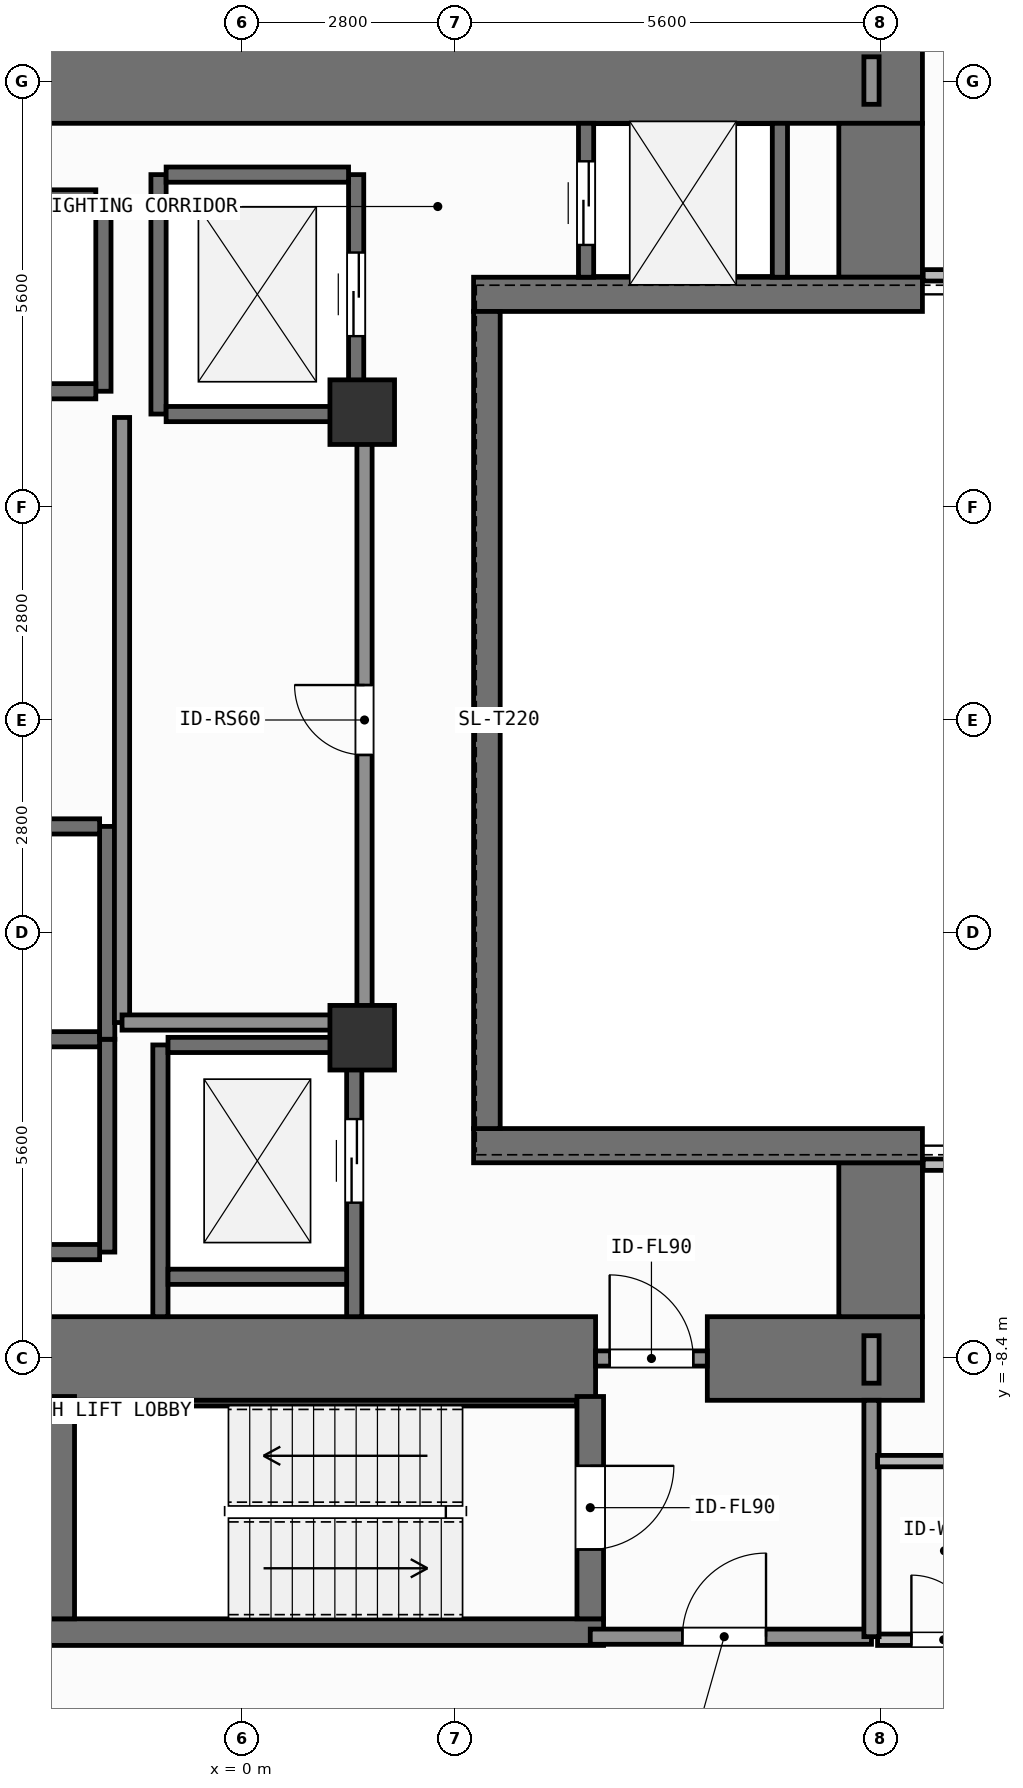
"""IFC4 building model, lengths in metres.
Left out: names, types, materials, properties, quantities, classifications, styles, units other than length and angle.
Written with IfcOpenShell. Run it as: python <this file> out.ifc"""

import sys

from ifc_helpers import new_model, si_unit, direction, frame, frame_2d, origin, origin_2d, place, context, subcontext, project, spatial, rectangle, extrude, element, fill, save


model = new_model("IFC4")
c1 = context("Model", 3, precision=1e-05, world=origin(), true_north=direction((0.0, 1.0)))
c2 = subcontext(c1, "Body", "Model", "MODEL_VIEW")
j1 = project(units=[si_unit("LENGTHUNIT", "METRE"), si_unit("PLANEANGLEUNIT", "RADIAN")], contexts=[c1])
p1 = place(None, origin())
s1 = spatial("IfcSite", under=j1, at=p1, CompositionType="ELEMENT")
p2 = place(p1, origin())
s2 = spatial("IfcBuilding", under=s1, at=p2, CompositionType="ELEMENT")
p3 = place(p2, frame((0.0, 0.0, 50.1)))
s3 = spatial("IfcBuildingStorey", under=s2, at=p3, CompositionType="ELEMENT", Elevation=50.1)
p4 = place(p3, frame((-2.62, -8.4, 0.0), z_axis=(0.0, 0.0, 1.0), x_axis=(1.0, 0.0, 0.0)))
e1 = element("IfcWall", 1, at=p4, inside=s3, PredefinedType="SHEAR", context=c2, shape_type="SweptSolid", body=[
    extrude(rectangle(XDim=7.27, YDim=1.1, at=frame_2d((3.635, 0.0))), origin(), (0.0, 0.0, 1.0), 3.9),
])
p5 = place(p3, frame((6.12, -8.4, 0.0), z_axis=(0.0, 0.0, 1.0), x_axis=(1.0, 0.0, 0.0)))
e2 = element("IfcWall", 2, at=p5, inside=s3, PredefinedType="SHEAR", context=c2, shape_type="SweptSolid", body=[
    extrude(rectangle(XDim=2.83, YDim=1.1, at=frame_2d((1.415, 0.0))), origin(), (0.0, 0.0, 1.0), 3.9),
])
p6 = place(p3, frame((-7.55, 8.4, 0.0), z_axis=(0.0, 0.0, 1.0), x_axis=(1.0, 0.0, 0.0)))
e3 = element("IfcWall", 3, at=p6, inside=s3, PredefinedType="SHEAR", context=c2, shape_type="SweptSolid", body=[
    extrude(rectangle(XDim=16.5, YDim=1.1, at=frame_2d((8.25, 0.0))), origin(), (0.0, 0.0, 1.0), 3.9),
])
for number, where, z_axis, x_axis in (
    (4, (8.4, -7.85, 0.0), (0.0, 0.0, 1.0), (0.0, 1.0, 0.0)),
    (5, (8.4, 5.825, 0.0), (0.0, 0.0, 1.0), (0.0, 1.0, 0.0)),
):
    element("IfcWall", number, at=place(p3, frame(where, z_axis=z_axis, x_axis=x_axis)), inside=s3, PredefinedType="SHEAR", context=c2, shape_type="SweptSolid", body=[
        extrude(rectangle(XDim=2.025, YDim=1.1, at=frame_2d((1.013, 0.0))), origin(), (0.0, 0.0, 1.0), 3.9),
    ])
for number, where, z_axis, x_axis in (
    (6, (3.045, -5.6, 0.0), (0.0, 0.0, 1.0), (1.0, 0.0, 0.0)),
    (7, (3.045, 5.6, 0.0), (0.0, 0.0, 1.0), (1.0, 0.0, 0.0)),
):
    element("IfcWall", number, at=place(p3, frame(where, z_axis=z_axis, x_axis=x_axis)), inside=s3, PredefinedType="SHEAR", context=c2, shape_type="SweptSolid", body=[
        extrude(rectangle(XDim=5.905, YDim=0.45, at=frame_2d((2.953, 0.0))), origin(), (0.0, 0.0, 1.0), 3.9),
    ])
p7 = place(p3, frame((3.22, -5.375, 0.0), z_axis=(0.0, 0.0, 1.0), x_axis=(0.0, 1.0, 0.0)))
e8 = element("IfcWall", 8, at=p7, inside=s3, PredefinedType="SHEAR", context=c2, shape_type="SweptSolid", body=[
    extrude(rectangle(XDim=10.75, YDim=0.35, at=frame_2d((5.375, 0.0))), origin(), (0.0, 0.0, 1.0), 3.9),
])
p8 = place(p3, frame((-2.555, -12.0, 0.0), z_axis=(0.0, 0.0, 1.0), x_axis=(1.0, 0.0, 0.0)))
e9 = element("IfcWall", 9, at=p8, inside=s3, PredefinedType="SHEAR", context=c2, shape_type="SweptSolid", body=[
    extrude(rectangle(XDim=7.31, YDim=0.35, at=frame_2d((3.655, 0.0))), origin(), (0.0, 0.0, 1.0), 3.9),
])
p9 = place(p3, frame((-2.2, -8.988, 0.0), z_axis=(0.0, 0.0, 1.0), x_axis=(1.0, 0.0, 0.0)))
e10 = element("IfcWall", 10, at=p9, inside=s3, PredefinedType="SHEAR", context=c2, shape_type="SweptSolid", body=[
    extrude(rectangle(XDim=6.6, YDim=0.075, at=frame_2d((3.3, 0.0))), origin(), (0.0, 0.0, 1.0), 3.9),
])
p10 = place(p3, frame((-2.38, -11.825, 0.0), z_axis=(0.0, 0.0, 1.0), x_axis=(0.0, 1.0, 0.0)))
e11 = element("IfcWall", 11, at=p10, inside=s3, PredefinedType="SHEAR", context=c2, shape_type="SweptSolid", body=[
    extrude(rectangle(XDim=2.925, YDim=0.35, at=frame_2d((1.462, 0.0))), origin(), (0.0, 0.0, 1.0), 3.9),
])
p11 = place(p3, frame((4.58, -8.9, 0.0), z_axis=(0.0, 0.0, 1.0), x_axis=(0.0, -1.0, 0.0)))
e12 = element("IfcWall", 12, at=p11, inside=s3, PredefinedType="SHEAR", context=c2, shape_type="SweptSolid", body=[
    extrude(rectangle(XDim=2.925, YDim=0.35, at=frame_2d((1.462, 0.0))), origin(), (0.0, 0.0, 1.0), 3.9),
])
p12 = place(p11, frame((0.913, 0.0, 0.0)))
e13 = element("IfcOpeningElement", 13, at=p12, cuts=e12, PredefinedType="OPENING", context=c2, shape_type="SweptSolid", body=[
    extrude(rectangle(XDim=1.1, YDim=2.15, at=frame_2d((0.55, 1.075))), frame((0.0, 0.185, 0.0), z_axis=(0.0, -1.0, 0.0), x_axis=(1.0, 0.0, 0.0)), (0.0, 0.0, 1.0), 0.37),
])
for number, where, z_axis, x_axis in (
    (14, (1.58, -4.18, 0.0), (0.0, 0.0, 1.0), (1.0, 0.0, 0.0)),
    (15, (1.58, 4.05, 0.0), (0.0, 0.0, 1.0), (1.0, 0.0, 0.0)),
):
    element("IfcColumn", number, at=place(p3, frame(where, z_axis=z_axis, x_axis=x_axis)), inside=s3, PredefinedType="COLUMN", context=c2, shape_type="SweptSolid", body=[
        extrude(rectangle(XDim=0.85, YDim=0.85, at=origin_2d()), origin(), (0.0, 0.0, 1.0), 3.9),
    ])
p13 = place(p3, frame((-1.825, 4.325, 0.0), z_axis=(0.0, 0.0, 1.0), x_axis=(0.0, 1.0, 0.0)))
e16 = element("IfcWall", 16, at=p13, inside=s3, PredefinedType="SHEAR", context=c2, shape_type="SweptSolid", body=[
    extrude(rectangle(XDim=2.55, YDim=0.2, at=frame_2d((1.275, 0.0))), origin(), (0.0, 0.0, 1.0), 3.62),
])
for number, where, z_axis, x_axis in (
    (17, (-4.275, 4.325, 0.0), (0.0, 0.0, 1.0), (1.0, 0.0, 0.0)),
    (18, (-4.275, 6.875, 0.0), (0.0, 0.0, 1.0), (1.0, 0.0, 0.0)),
):
    element("IfcWall", number, at=place(p3, frame(where, z_axis=z_axis, x_axis=x_axis)), inside=s3, PredefinedType="SHEAR", context=c2, shape_type="SweptSolid", body=[
        extrude(rectangle(XDim=2.35, YDim=0.2, at=frame_2d((1.175, 0.0))), origin(), (0.0, 0.0, 1.0), 3.62),
    ])
p14 = place(p3, frame((-1.775, -7.0, 0.0), z_axis=(0.0, 0.0, 1.0), x_axis=(0.0, 1.0, 0.0)))
e19 = element("IfcWall", 19, at=p14, inside=s3, PredefinedType="SHEAR", context=c2, shape_type="SweptSolid", body=[
    extrude(rectangle(XDim=2.8, YDim=0.2, at=frame_2d((1.4, 0.0))), origin(), (0.0, 0.0, 1.0), 3.62),
])
for number, where, z_axis, x_axis in (
    (20, (-4.325, -7.0, 0.0), (0.0, 0.0, 1.0), (1.0, 0.0, 0.0)),
    (21, (-4.325, -4.2, 0.0), (0.0, 0.0, 1.0), (1.0, 0.0, 0.0)),
):
    element("IfcWall", number, at=place(p3, frame(where, z_axis=z_axis, x_axis=x_axis)), inside=s3, PredefinedType="SHEAR", context=c2, shape_type="SweptSolid", body=[
        extrude(rectangle(XDim=2.45, YDim=0.2, at=frame_2d((1.225, 0.0))), origin(), (0.0, 0.0, 1.0), 3.62),
    ])
p15 = place(p3, frame((-1.775, -4.2, 0.0), z_axis=(0.0, 0.0, 1.0), x_axis=(0.0, 1.0, 0.0)))
e22 = element("IfcWall", 22, at=p15, inside=s3, PredefinedType="SHEAR", context=c2, shape_type="SweptSolid", body=[
    extrude(rectangle(XDim=2.8, YDim=0.2, at=frame_2d((1.4, 0.0))), origin(), (0.0, 0.0, 1.0), 3.62),
])
p16 = place(p3, frame((-4.325, -1.4, 0.0), z_axis=(0.0, 0.0, 1.0), x_axis=(1.0, 0.0, 0.0)))
e23 = element("IfcWall", 23, at=p16, inside=s3, PredefinedType="SHEAR", context=c2, shape_type="SweptSolid", body=[
    extrude(rectangle(XDim=2.45, YDim=0.2, at=frame_2d((1.225, 0.0))), origin(), (0.0, 0.0, 1.0), 3.62),
])
p17 = place(p3, frame((-1.1, 4.025, 0.0), z_axis=(0.0, 0.0, 1.0), x_axis=(0.0, 1.0, 0.0)))
e24 = element("IfcWall", 24, at=p17, inside=s3, PredefinedType="SHEAR", context=c2, shape_type="SweptSolid", body=[
    extrude(rectangle(XDim=3.15, YDim=0.2, at=frame_2d((1.575, 0.0))), origin(), (0.0, 0.0, 1.0), 3.62),
])
p18 = place(p3, frame((1.5, 4.025, 0.0), z_axis=(0.0, 0.0, 1.0), x_axis=(0.0, 1.0, 0.0)))
e25 = element("IfcWall", 25, at=p18, inside=s3, PredefinedType="SHEAR", context=c2, shape_type="SweptSolid", body=[
    extrude(rectangle(XDim=3.15, YDim=0.2, at=frame_2d((1.575, 0.0))), origin(), (0.0, 0.0, 1.0), 3.62),
])
p19 = place(p18, frame((1.025, 0.0, 0.0)))
e26 = element("IfcOpeningElement", 26, at=p19, cuts=e25, PredefinedType="OPENING", context=c2, shape_type="SweptSolid", body=[
    extrude(rectangle(XDim=1.1, YDim=2.2, at=frame_2d((0.55, 1.1))), frame((0.0, 0.11, 0.0), z_axis=(0.0, -1.0, 0.0), x_axis=(1.0, 0.0, 0.0)), (0.0, 0.0, 1.0), 0.22),
])
for number, where, z_axis, x_axis in (
    (27, (-1.0, 4.025, 0.0), (0.0, 0.0, 1.0), (1.0, 0.0, 0.0)),
    (28, (-1.0, 7.175, 0.0), (0.0, 0.0, 1.0), (1.0, 0.0, 0.0)),
):
    element("IfcWall", number, at=place(p3, frame(where, z_axis=z_axis, x_axis=x_axis)), inside=s3, PredefinedType="SHEAR", context=c2, shape_type="SweptSolid", body=[
        extrude(rectangle(XDim=2.4, YDim=0.2, at=frame_2d((1.2, 0.0))), origin(), (0.0, 0.0, 1.0), 3.62),
    ])
p20 = place(p3, frame((-1.075, -7.85, 0.0), z_axis=(0.0, 0.0, 1.0), x_axis=(0.0, 1.0, 0.0)))
e29 = element("IfcWall", 29, at=p20, inside=s3, PredefinedType="SHEAR", context=c2, shape_type="SweptSolid", body=[
    extrude(rectangle(XDim=3.575, YDim=0.2, at=frame_2d((1.788, 0.0))), origin(), (0.0, 0.0, 1.0), 3.62),
])
p21 = place(p3, frame((1.475, -7.85, 0.0), z_axis=(0.0, 0.0, 1.0), x_axis=(0.0, 1.0, 0.0)))
e30 = element("IfcWall", 30, at=p21, inside=s3, PredefinedType="SHEAR", context=c2, shape_type="SweptSolid", body=[
    extrude(rectangle(XDim=3.575, YDim=0.2, at=frame_2d((1.788, 0.0))), origin(), (0.0, 0.0, 1.0), 3.62),
])
p22 = place(p21, frame((1.5, 0.0, 0.0)))
e31 = element("IfcOpeningElement", 31, at=p22, cuts=e30, PredefinedType="OPENING", context=c2, shape_type="SweptSolid", body=[
    extrude(rectangle(XDim=1.1, YDim=2.2, at=frame_2d((0.55, 1.1))), frame((0.0, 0.11, 0.0), z_axis=(0.0, -1.0, 0.0), x_axis=(1.0, 0.0, 0.0)), (0.0, 0.0, 1.0), 0.22),
])
for number, where, z_axis, x_axis in (
    (32, (-0.975, -7.325, 0.0), (0.0, 0.0, 1.0), (1.0, 0.0, 0.0)),
    (33, (-0.975, -4.275, 0.0), (0.0, 0.0, 1.0), (1.0, 0.0, 0.0)),
):
    element("IfcWall", number, at=place(p3, frame(where, z_axis=z_axis, x_axis=x_axis)), inside=s3, PredefinedType="SHEAR", context=c2, shape_type="SweptSolid", body=[
        extrude(rectangle(XDim=2.35, YDim=0.2, at=frame_2d((1.175, 0.0))), origin(), (0.0, 0.0, 1.0), 3.62),
    ])
p23 = place(p3, frame((4.525, 5.825, 0.0), z_axis=(0.0, 0.0, 1.0), x_axis=(0.0, 1.0, 0.0)))
e34 = element("IfcWall", 34, at=p23, inside=s3, PredefinedType="SHEAR", context=c2, shape_type="SweptSolid", body=[
    extrude(rectangle(XDim=2.025, YDim=0.2, at=frame_2d((1.013, 0.0))), origin(), (0.0, 0.0, 1.0), 3.62),
])
p24 = place(p23, frame((0.425, 0.0, 0.0)))
e35 = element("IfcOpeningElement", 35, at=p24, cuts=e34, PredefinedType="OPENING", context=c2, shape_type="SweptSolid", body=[
    extrude(rectangle(XDim=1.1, YDim=2.2, at=frame_2d((0.55, 1.1))), frame((0.0, 0.11, 0.0), z_axis=(0.0, -1.0, 0.0), x_axis=(1.0, 0.0, 0.0)), (0.0, 0.0, 1.0), 0.22),
])
p25 = place(p3, frame((7.075, 5.825, 0.0), z_axis=(0.0, 0.0, 1.0), x_axis=(0.0, 1.0, 0.0)))
e36 = element("IfcWall", 36, at=p25, inside=s3, PredefinedType="SHEAR", context=c2, shape_type="SweptSolid", body=[
    extrude(rectangle(XDim=2.025, YDim=0.2, at=frame_2d((1.013, 0.0))), origin(), (0.0, 0.0, 1.0), 3.62),
])
p26 = place(p3, frame((4.58, -12.06, 0.0), z_axis=(0.0, 0.0, 1.0), x_axis=(1.0, 0.0, 0.0)))
e37 = element("IfcWall", 37, at=p26, inside=s3, PredefinedType="SOLIDWALL", context=c2, shape_type="SweptSolid", body=[
    extrude(rectangle(XDim=3.7, YDim=0.2, at=frame_2d((1.85, 0.0))), origin(), (0.0, 0.0, 1.0), 3.62),
])
p27 = place(p26, frame((1.212, 0.0, 0.0)))
e38 = element("IfcOpeningElement", 38, at=p27, cuts=e37, PredefinedType="OPENING", context=c2, shape_type="SweptSolid", body=[
    extrude(rectangle(XDim=1.1, YDim=2.15, at=frame_2d((0.55, 1.075))), frame((0.0, 0.11, 0.0), z_axis=(0.0, -1.0, 0.0), x_axis=(1.0, 0.0, 0.0)), (0.0, 0.0, 1.0), 0.22),
])
p28 = place(p3, frame((4.65, -8.4, 0.0), z_axis=(0.0, 0.0, 1.0), x_axis=(1.0, 0.0, 0.0)))
e39 = element("IfcWall", 39, at=p28, inside=s3, PredefinedType="SOLIDWALL", context=c2, shape_type="SweptSolid", body=[
    extrude(rectangle(XDim=1.47, YDim=0.2, at=frame_2d((0.735, 0.0))), origin(), (0.0, 0.0, 1.0), 2.66),
])
p29 = place(p28, frame((0.185, 0.0, 0.0)))
e40 = element("IfcOpeningElement", 40, at=p29, cuts=e39, PredefinedType="OPENING", context=c2, shape_type="SweptSolid", body=[
    extrude(rectangle(XDim=1.1, YDim=2.15, at=frame_2d((0.55, 1.075))), frame((0.0, 0.11, 0.0), z_axis=(0.0, -1.0, 0.0), x_axis=(1.0, 0.0, 0.0)), (0.0, 0.0, 1.0), 0.22),
])
p30 = place(p3, frame((1.61, -3.98, 0.0), z_axis=(0.0, 0.0, 1.0), x_axis=(0.0, 1.0, 0.0)))
e41 = element("IfcWall", 41, at=p30, inside=s3, PredefinedType="SOLIDWALL", context=c2, shape_type="SweptSolid", body=[
    extrude(rectangle(XDim=7.96, YDim=0.2, at=frame_2d((3.98, 0.0))), origin(), (0.0, 0.0, 1.0), 3.62),
])
p31 = place(p30, frame((3.52, 0.0, 0.0)))
e42 = element("IfcOpeningElement", 42, at=p31, cuts=e41, PredefinedType="OPENING", context=c2, shape_type="SweptSolid", body=[
    extrude(rectangle(XDim=0.92, YDim=2.1, at=frame_2d((0.46, 1.05))), frame((0.0, 0.11, 0.0), z_axis=(0.0, -1.0, 0.0), x_axis=(1.0, 0.0, 0.0)), (0.0, 0.0, 1.0), 0.22),
])
p32 = place(p3, frame((8.36, -12.1, 0.0), z_axis=(0.0, 0.0, 1.0), x_axis=(1.0, 0.0, 0.0)))
e43 = element("IfcWall", 43, at=p32, inside=s3, PredefinedType="PARTITIONING", context=c2, shape_type="SweptSolid", body=[
    extrude(rectangle(XDim=1.74, YDim=0.15, at=frame_2d((0.87, 0.0))), origin(), (0.0, 0.0, 1.0), 3.62),
])
p33 = place(p32, frame((0.445, 0.0, 0.0)))
e44 = element("IfcOpeningElement", 44, at=p33, cuts=e43, PredefinedType="OPENING", context=c2, shape_type="SweptSolid", body=[
    extrude(rectangle(XDim=0.85, YDim=2.1, at=frame_2d((0.425, 1.05))), frame((0.0, 0.085, 0.0), z_axis=(0.0, -1.0, 0.0), x_axis=(1.0, 0.0, 0.0)), (0.0, 0.0, 1.0), 0.17),
])
p34 = place(p3, frame((8.28, -12.06, 0.0), z_axis=(0.0, 0.0, 1.0), x_axis=(0.0, 1.0, 0.0)))
e45 = element("IfcWall", 45, at=p34, inside=s3, PredefinedType="SOLIDWALL", context=c2, shape_type="SweptSolid", body=[
    extrude(rectangle(XDim=3.11, YDim=0.2, at=frame_2d((1.555, 0.0))), origin(), (0.0, 0.0, 1.0), 3.62),
])
p35 = place(p3, frame((-1.58, -3.98, 0.0), z_axis=(0.0, 0.0, 1.0), x_axis=(0.0, 1.0, 0.0)))
e46 = element("IfcWall", 46, at=p35, inside=s3, PredefinedType="SOLIDWALL", context=c2, shape_type="SweptSolid", body=[
    extrude(rectangle(XDim=7.96, YDim=0.2, at=frame_2d((3.98, 0.0))), origin(), (0.0, 0.0, 1.0), 3.62),
])
p36 = place(p3, frame((-1.58, -3.98, 0.0), z_axis=(0.0, 0.0, 1.0), x_axis=(1.0, 0.0, 0.0)))
e47 = element("IfcWall", 47, at=p36, inside=s3, PredefinedType="SOLIDWALL", context=c2, shape_type="SweptSolid", body=[
    extrude(rectangle(XDim=3.19, YDim=0.2, at=frame_2d((1.595, 0.0))), origin(), (0.0, 0.0, 1.0), 3.62),
])
p37 = place(p3, frame((8.28, -8.725, 0.0), z_axis=(0.0, 0.0, 1.0), x_axis=(0.0, 1.0, 0.0)))
e48 = element("IfcWall", 48, at=p37, inside=s3, PredefinedType="SOLIDWALL", context=c2, shape_type="SweptSolid", body=[
    extrude(rectangle(XDim=0.625, YDim=0.2, at=frame_2d((0.312, 0.0))), origin(), (0.0, 0.0, 1.0), 3.62),
])
p38 = place(p3, frame((8.36, -9.75, 0.0), z_axis=(0.0, 0.0, 1.0), x_axis=(1.0, 0.0, 0.0)))
e49 = element("IfcWall", 49, at=p38, inside=s3, PredefinedType="PARTITIONING", context=c2, shape_type="SweptSolid", body=[
    extrude(rectangle(XDim=1.74, YDim=0.15, at=frame_2d((0.87, 0.0))), origin(), (0.0, 0.0, 1.0), 3.62),
])
p39 = place(p3, frame((8.96, -5.85, 0.0), z_axis=(0.0, 0.0, 1.0), x_axis=(1.0, 0.0, 0.0)))
e50 = element("IfcWall", 50, at=p39, inside=s3, PredefinedType="PARTITIONING", context=c2, shape_type="SweptSolid", body=[
    extrude(rectangle(XDim=6.62, YDim=0.15, at=frame_2d((3.31, 0.0))), origin(), (0.0, 0.0, 1.0), 3.62),
])
p40 = place(p3, frame((8.28, 8.1, 0.0), z_axis=(0.0, 0.0, 1.0), x_axis=(0.0, 1.0, 0.0)))
e51 = element("IfcWall", 51, at=p40, inside=s3, PredefinedType="SOLIDWALL", context=c2, shape_type="SweptSolid", body=[
    extrude(rectangle(XDim=0.625, YDim=0.2, at=frame_2d((0.312, 0.0))), origin(), (0.0, 0.0, 1.0), 3.62),
])
p41 = place(p3, frame((8.96, 5.85, 0.0), z_axis=(0.0, 0.0, 1.0), x_axis=(1.0, 0.0, 0.0)))
e52 = element("IfcWall", 52, at=p41, inside=s3, PredefinedType="PARTITIONING", context=c2, shape_type="SweptSolid", body=[
    extrude(rectangle(XDim=6.62, YDim=0.15, at=frame_2d((3.31, 0.0))), origin(), (0.0, 0.0, 1.0), 3.62),
])
p42 = place(p19, origin())
e53 = element("IfcDoor", 53, at=p42, inside=s3, OperationType="SLIDING_TO_LEFT", PredefinedType="DOOR", context=c2, shape_type="SweptSolid", body=[
    extrude(rectangle(XDim=1.1, YDim=2.2, at=frame_2d((0.55, 1.1))), frame((0.0, 0.025, 0.0), z_axis=(0.0, -1.0, 0.0), x_axis=(1.0, 0.0, 0.0)), (0.0, 0.0, 1.0), 0.05),
])
fill(e26, e53)
p43 = place(p22, origin())
e54 = element("IfcDoor", 54, at=p43, inside=s3, OperationType="SLIDING_TO_LEFT", PredefinedType="DOOR", context=c2, shape_type="SweptSolid", body=[
    extrude(rectangle(XDim=1.1, YDim=2.2, at=frame_2d((0.55, 1.1))), frame((0.0, 0.025, 0.0), z_axis=(0.0, -1.0, 0.0), x_axis=(1.0, 0.0, 0.0)), (0.0, 0.0, 1.0), 0.05),
])
fill(e31, e54)
p44 = place(p24, origin())
e55 = element("IfcDoor", 55, at=p44, inside=s3, OperationType="SLIDING_TO_LEFT", PredefinedType="DOOR", context=c2, shape_type="SweptSolid", body=[
    extrude(rectangle(XDim=1.1, YDim=2.2, at=frame_2d((0.55, 1.1))), frame((0.0, 0.025, 0.0), z_axis=(0.0, -1.0, 0.0), x_axis=(1.0, 0.0, 0.0)), (0.0, 0.0, 1.0), 0.05),
])
fill(e35, e55)
p45 = place(p12, origin())
e56 = element("IfcDoor", 56, at=p45, inside=s3, OperationType="SINGLE_SWING_LEFT", PredefinedType="DOOR", context=c2, shape_type="SweptSolid", body=[
    extrude(rectangle(XDim=1.1, YDim=2.15, at=frame_2d((0.55, 1.075))), frame((0.0, 0.025, 0.0), z_axis=(0.0, -1.0, 0.0), x_axis=(1.0, 0.0, 0.0)), (0.0, 0.0, 1.0), 0.05),
])
fill(e13, e56)
p46 = place(p27, origin())
e57 = element("IfcDoor", 57, at=p46, inside=s3, OperationType="SINGLE_SWING_RIGHT", PredefinedType="DOOR", context=c2, shape_type="SweptSolid", body=[
    extrude(rectangle(XDim=1.1, YDim=2.15, at=frame_2d((0.55, 1.075))), frame((0.0, 0.025, 0.0), z_axis=(0.0, -1.0, 0.0), x_axis=(1.0, 0.0, 0.0)), (0.0, 0.0, 1.0), 0.05),
])
fill(e38, e57)
p47 = place(p29, origin())
e58 = element("IfcDoor", 58, at=p47, inside=s3, OperationType="SINGLE_SWING_LEFT", PredefinedType="DOOR", context=c2, shape_type="SweptSolid", body=[
    extrude(rectangle(XDim=1.1, YDim=2.15, at=frame_2d((0.55, 1.075))), frame((0.0, 0.025, 0.0), z_axis=(0.0, -1.0, 0.0), x_axis=(1.0, 0.0, 0.0)), (0.0, 0.0, 1.0), 0.05),
])
fill(e40, e58)
p48 = place(p31, origin())
e59 = element("IfcDoor", 59, at=p48, inside=s3, OperationType="SINGLE_SWING_RIGHT", PredefinedType="DOOR", context=c2, shape_type="SweptSolid", body=[
    extrude(rectangle(XDim=0.92, YDim=2.1, at=frame_2d((0.46, 1.05))), frame((0.0, 0.025, 0.0), z_axis=(0.0, -1.0, 0.0), x_axis=(1.0, 0.0, 0.0)), (0.0, 0.0, 1.0), 0.05),
])
fill(e42, e59)
p49 = place(p33, origin())
e60 = element("IfcDoor", 60, at=p49, inside=s3, OperationType="SINGLE_SWING_LEFT", PredefinedType="DOOR", context=c2, shape_type="SweptSolid", body=[
    extrude(rectangle(XDim=0.85, YDim=2.1, at=frame_2d((0.425, 1.05))), frame((0.0, 0.025, 0.0), z_axis=(0.0, -1.0, 0.0), x_axis=(1.0, 0.0, 0.0)), (0.0, 0.0, 1.0), 0.05),
])
fill(e44, e60)
save(model, sys.argv[1])
